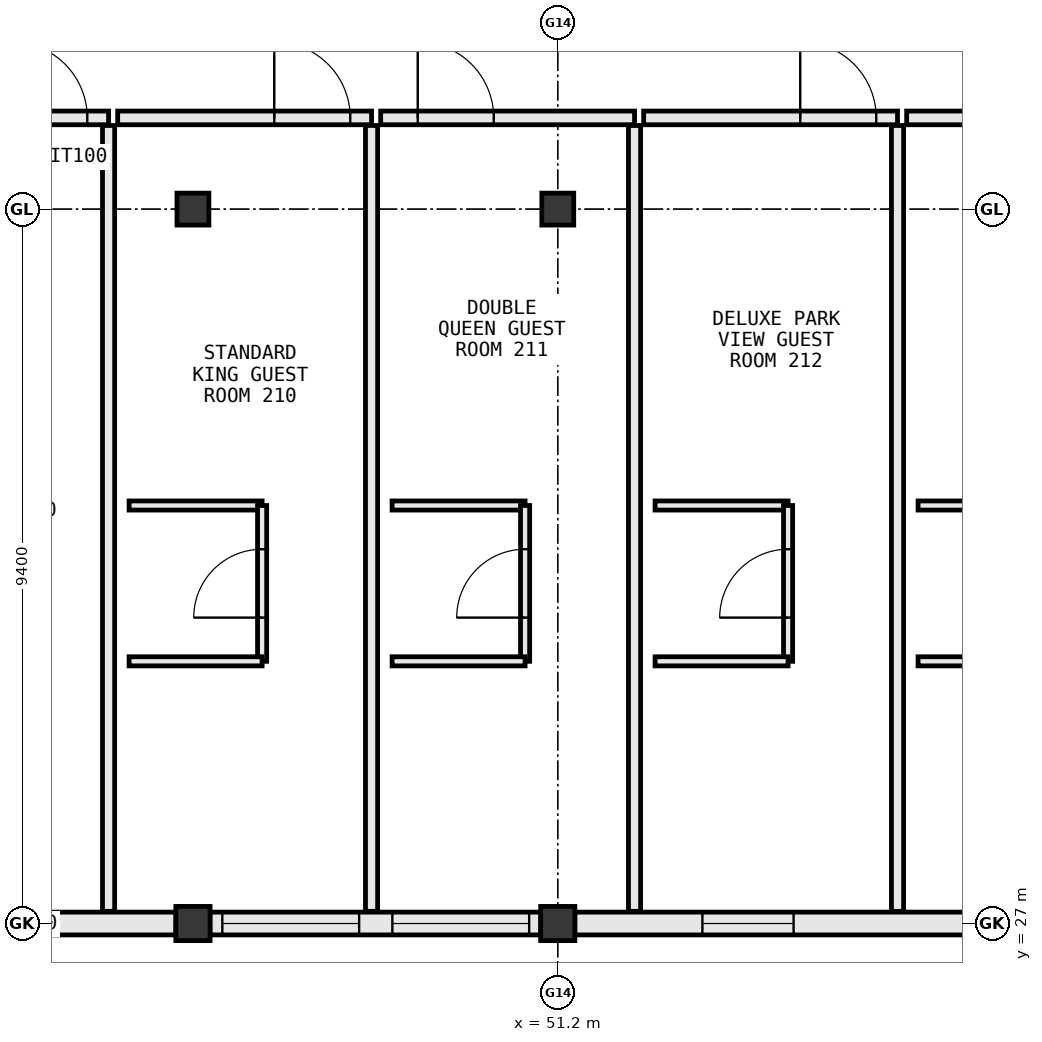
"""IFC4 building model, lengths in metres.
Left out: names, types, materials, properties, quantities, classifications, styles, units other than length and angle.
Written with IfcOpenShell. Run it as: python <this file> out.ifc"""

import sys

from ifc_helpers import new_model, si_unit, direction, frame, frame_2d, origin, origin_2d, place, context, subcontext, project, spatial, rectangle, extrude, element, fill, save


model = new_model("IFC4")
c1 = context("Model", 3, precision=1e-05, world=origin(), true_north=direction((0.0, 1.0)))
c2 = subcontext(c1, "Body", "Model", "MODEL_VIEW")
j1 = project(units=[si_unit("LENGTHUNIT", "METRE"), si_unit("PLANEANGLEUNIT", "RADIAN")], contexts=[c1])
p1 = place(None, origin())
s1 = spatial("IfcSite", under=j1, at=p1, CompositionType="ELEMENT")
p2 = place(p1, origin())
s2 = spatial("IfcBuilding", under=s1, at=p2, CompositionType="ELEMENT")
p3 = place(p2, frame((0.0, 0.0, 27.6)))
s3 = spatial("IfcBuildingStorey", under=s2, at=p3, CompositionType="ELEMENT", Elevation=27.6)
p4 = place(p3, frame((46.4, 27.0, 0.0), z_axis=(0.0, 0.0, 1.0), x_axis=(1.0, 0.0, 0.0)))
e1 = element("IfcColumn", 1, at=p4, inside=s3, PredefinedType="COLUMN", context=c2, shape_type="SweptSolid", body=[
    extrude(rectangle(XDim=0.45, YDim=0.45, at=origin_2d()), origin(), (0.0, 0.0, 1.0), 3.8),
])
p5 = place(p3, frame((46.4, 36.4, 0.0), z_axis=(0.0, 0.0, 1.0), x_axis=(1.0, 0.0, 0.0)))
e2 = element("IfcColumn", 2, at=p5, inside=s3, PredefinedType="COLUMN", context=c2, shape_type="SweptSolid", body=[
    extrude(rectangle(XDim=0.42, YDim=0.42, at=origin_2d()), origin(), (0.0, 0.0, 1.0), 3.8),
])
p6 = place(p3, frame((51.2, 27.0, 0.0), z_axis=(0.0, 0.0, 1.0), x_axis=(1.0, 0.0, 0.0)))
e3 = element("IfcColumn", 3, at=p6, inside=s3, PredefinedType="COLUMN", context=c2, shape_type="SweptSolid", body=[
    extrude(rectangle(XDim=0.45, YDim=0.45, at=origin_2d()), origin(), (0.0, 0.0, 1.0), 3.8),
])
p7 = place(p3, frame((51.2, 36.4, 0.0), z_axis=(0.0, 0.0, 1.0), x_axis=(1.0, 0.0, 0.0)))
e4 = element("IfcColumn", 4, at=p7, inside=s3, PredefinedType="COLUMN", context=c2, shape_type="SweptSolid", body=[
    extrude(rectangle(XDim=0.42, YDim=0.42, at=origin_2d()), origin(), (0.0, 0.0, 1.0), 3.8),
])
p8 = place(p3, frame((41.823, 27.0, 0.0), z_axis=(0.0, 0.0, 1.0), x_axis=(1.0, 0.0, 0.0)))
e5 = element("IfcWall", 5, at=p8, inside=s3, PredefinedType="STANDARD", context=c2, shape_type="SweptSolid", body=[
    extrude(rectangle(XDim=4.354, YDim=0.3, at=frame_2d((2.177, 0.0))), origin(), (0.0, 0.0, 1.0), 3.01),
])
p9 = place(p8, frame((1.577, 0.0, 0.85)))
e6 = element("IfcOpeningElement", 6, at=p9, cuts=e5, PredefinedType="OPENING", context=c2, shape_type="SweptSolid", body=[
    extrude(rectangle(XDim=1.2, YDim=1.55, at=frame_2d((0.6, 0.775))), frame((0.0, 0.162, 0.0), z_axis=(0.0, -1.0, 0.0), x_axis=(1.0, 0.0, 0.0)), (0.0, 0.0, 1.0), 0.324),
])
p10 = place(p3, frame((46.623, 27.0, 0.0), z_axis=(0.0, 0.0, 1.0), x_axis=(1.0, 0.0, 0.0)))
e7 = element("IfcWall", 7, at=p10, inside=s3, PredefinedType="STANDARD", context=c2, shape_type="SweptSolid", body=[
    extrude(rectangle(XDim=4.354, YDim=0.3, at=frame_2d((2.177, 0.0))), origin(), (0.0, 0.0, 1.0), 3.01),
])
p11 = place(p10, frame((0.164, 0.0, 0.85)))
e8 = element("IfcOpeningElement", 8, at=p11, cuts=e7, PredefinedType="OPENING", context=c2, shape_type="SweptSolid", body=[
    extrude(rectangle(XDim=1.8, YDim=1.85, at=frame_2d((0.9, 0.925))), frame((0.0, 0.162, 0.0), z_axis=(0.0, -1.0, 0.0), x_axis=(1.0, 0.0, 0.0)), (0.0, 0.0, 1.0), 0.324),
])
p12 = place(p10, frame((2.4, 0.0, 0.85)))
e9 = element("IfcOpeningElement", 9, at=p12, cuts=e7, PredefinedType="OPENING", context=c2, shape_type="SweptSolid", body=[
    extrude(rectangle(XDim=1.8, YDim=1.85, at=frame_2d((0.9, 0.925))), frame((0.0, 0.162, 0.0), z_axis=(0.0, -1.0, 0.0), x_axis=(1.0, 0.0, 0.0)), (0.0, 0.0, 1.0), 0.324),
])
p13 = place(p3, frame((51.423, 27.0, 0.0), z_axis=(0.0, 0.0, 1.0), x_axis=(1.0, 0.0, 0.0)))
e10 = element("IfcWall", 10, at=p13, inside=s3, PredefinedType="STANDARD", context=c2, shape_type="SweptSolid", body=[
    extrude(rectangle(XDim=9.119, YDim=0.3, at=frame_2d((4.56, 0.0))), origin(), (0.0, 0.0, 1.0), 2.83),
])
p14 = place(p13, frame((1.68, 0.0, 0.85)))
e11 = element("IfcOpeningElement", 11, at=p14, cuts=e10, PredefinedType="OPENING", context=c2, shape_type="SweptSolid", body=[
    extrude(rectangle(XDim=1.2, YDim=1.55, at=frame_2d((0.6, 0.775))), frame((0.0, 0.162, 0.0), z_axis=(0.0, -1.0, 0.0), x_axis=(1.0, 0.0, 0.0)), (0.0, 0.0, 1.0), 0.324),
])
p15 = place(p13, frame((6.239, 0.0, 0.85)))
e12 = element("IfcOpeningElement", 12, at=p15, cuts=e10, PredefinedType="OPENING", context=c2, shape_type="SweptSolid", body=[
    extrude(rectangle(XDim=1.2, YDim=1.55, at=frame_2d((0.6, 0.775))), frame((0.0, 0.162, 0.0), z_axis=(0.0, -1.0, 0.0), x_axis=(1.0, 0.0, 0.0)), (0.0, 0.0, 1.0), 0.324),
])
p16 = place(p3, frame((45.29, 37.6, 0.0), z_axis=(0.0, 0.0, 1.0), x_axis=(-1.0, 0.0, 0.0)))
e13 = element("IfcWall", 13, at=p16, inside=s3, PredefinedType="PARTITIONING", context=c2, shape_type="SweptSolid", body=[
    extrude(rectangle(XDim=3.34, YDim=0.18, at=frame_2d((1.67, 0.0))), origin(), (0.0, 0.0, 1.0), 3.555),
])
p17 = place(p16, frame((0.28, 0.0, 0.0)))
e14 = element("IfcOpeningElement", 14, at=p17, cuts=e13, PredefinedType="OPENING", context=c2, shape_type="SweptSolid", body=[
    extrude(rectangle(XDim=1.0, YDim=2.2, at=frame_2d((0.5, 1.1))), frame((0.0, 0.102, 0.0), z_axis=(0.0, -1.0, 0.0), x_axis=(1.0, 0.0, 0.0)), (0.0, 0.0, 1.0), 0.204),
])
p18 = place(p3, frame((45.29, 27.16, 0.0), z_axis=(0.0, 0.0, 1.0), x_axis=(0.0, 1.0, 0.0)))
e15 = element("IfcWall", 15, at=p18, inside=s3, PredefinedType="PARTITIONING", context=c2, shape_type="SweptSolid", body=[
    extrude(rectangle(XDim=10.34, YDim=0.16, at=frame_2d((5.17, 0.0))), origin(), (0.0, 0.0, 1.0), 3.555),
])
p19 = place(p3, frame((48.75, 37.6, 0.0), z_axis=(0.0, 0.0, 1.0), x_axis=(-1.0, 0.0, 0.0)))
e16 = element("IfcWall", 16, at=p19, inside=s3, PredefinedType="PARTITIONING", context=c2, shape_type="SweptSolid", body=[
    extrude(rectangle(XDim=3.34, YDim=0.18, at=frame_2d((1.67, 0.0))), origin(), (0.0, 0.0, 1.0), 3.555),
])
p20 = place(p19, frame((0.28, 0.0, 0.0)))
e17 = element("IfcOpeningElement", 17, at=p20, cuts=e16, PredefinedType="OPENING", context=c2, shape_type="SweptSolid", body=[
    extrude(rectangle(XDim=1.0, YDim=2.2, at=frame_2d((0.5, 1.1))), frame((0.0, 0.102, 0.0), z_axis=(0.0, -1.0, 0.0), x_axis=(1.0, 0.0, 0.0)), (0.0, 0.0, 1.0), 0.204),
])
p21 = place(p3, frame((48.75, 27.16, 0.0), z_axis=(0.0, 0.0, 1.0), x_axis=(0.0, 1.0, 0.0)))
e18 = element("IfcWall", 18, at=p21, inside=s3, PredefinedType="PARTITIONING", context=c2, shape_type="SweptSolid", body=[
    extrude(rectangle(XDim=10.34, YDim=0.16, at=frame_2d((5.17, 0.0))), origin(), (0.0, 0.0, 1.0), 3.1),
])
p22 = place(p3, frame((45.56, 32.5, 0.0), z_axis=(0.0, 0.0, 1.0), x_axis=(1.0, 0.0, 0.0)))
e19 = element("IfcWall", 19, at=p22, inside=s3, PredefinedType="PARTITIONING", context=c2, shape_type="SweptSolid", body=[
    extrude(rectangle(XDim=1.75, YDim=0.12, at=frame_2d((0.875, 0.0))), origin(), (0.0, 0.0, 1.0), 3.555),
])
p23 = place(p3, frame((47.31, 30.45, 0.0), z_axis=(0.0, 0.0, 1.0), x_axis=(0.0, 1.0, 0.0)))
e20 = element("IfcWall", 20, at=p23, inside=s3, PredefinedType="PARTITIONING", context=c2, shape_type="SweptSolid", body=[
    extrude(rectangle(XDim=2.05, YDim=0.12, at=frame_2d((1.025, 0.0))), origin(), (0.0, 0.0, 1.0), 3.555),
])
p24 = place(p23, frame((0.575, 0.0, 0.0)))
e21 = element("IfcOpeningElement", 21, at=p24, cuts=e20, PredefinedType="OPENING", context=c2, shape_type="SweptSolid", body=[
    extrude(rectangle(XDim=0.9, YDim=2.15, at=frame_2d((0.45, 1.075))), frame((0.0, 0.072, 0.0), z_axis=(0.0, -1.0, 0.0), x_axis=(1.0, 0.0, 0.0)), (0.0, 0.0, 1.0), 0.144),
])
p25 = place(p3, frame((45.56, 30.45, 0.0), z_axis=(0.0, 0.0, 1.0), x_axis=(1.0, 0.0, 0.0)))
e22 = element("IfcWall", 22, at=p25, inside=s3, PredefinedType="PARTITIONING", context=c2, shape_type="SweptSolid", body=[
    extrude(rectangle(XDim=1.75, YDim=0.12, at=frame_2d((0.875, 0.0))), origin(), (0.0, 0.0, 1.0), 3.555),
])
p26 = place(p3, frame((52.21, 37.6, 0.0), z_axis=(0.0, 0.0, 1.0), x_axis=(-1.0, 0.0, 0.0)))
e23 = element("IfcWall", 23, at=p26, inside=s3, PredefinedType="PARTITIONING", context=c2, shape_type="SweptSolid", body=[
    extrude(rectangle(XDim=3.34, YDim=0.18, at=frame_2d((1.67, 0.0))), origin(), (0.0, 0.0, 1.0), 3.555),
])
p27 = place(p26, frame((1.853, 0.0, 0.0)))
e24 = element("IfcOpeningElement", 24, at=p27, cuts=e23, PredefinedType="OPENING", context=c2, shape_type="SweptSolid", body=[
    extrude(rectangle(XDim=1.0, YDim=2.2, at=frame_2d((0.5, 1.1))), frame((0.0, 0.102, 0.0), z_axis=(0.0, -1.0, 0.0), x_axis=(1.0, 0.0, 0.0)), (0.0, 0.0, 1.0), 0.204),
])
p28 = place(p3, frame((52.21, 27.16, 0.0), z_axis=(0.0, 0.0, 1.0), x_axis=(0.0, 1.0, 0.0)))
e25 = element("IfcWall", 25, at=p28, inside=s3, PredefinedType="PARTITIONING", context=c2, shape_type="SweptSolid", body=[
    extrude(rectangle(XDim=10.34, YDim=0.16, at=frame_2d((5.17, 0.0))), origin(), (0.0, 0.0, 1.0), 3.555),
])
p29 = place(p3, frame((49.02, 32.5, 0.0), z_axis=(0.0, 0.0, 1.0), x_axis=(1.0, 0.0, 0.0)))
e26 = element("IfcWall", 26, at=p29, inside=s3, PredefinedType="PARTITIONING", context=c2, shape_type="SweptSolid", body=[
    extrude(rectangle(XDim=1.75, YDim=0.12, at=frame_2d((0.875, 0.0))), origin(), (0.0, 0.0, 1.0), 3.555),
])
p30 = place(p3, frame((50.77, 30.45, 0.0), z_axis=(0.0, 0.0, 1.0), x_axis=(0.0, 1.0, 0.0)))
e27 = element("IfcWall", 27, at=p30, inside=s3, PredefinedType="PARTITIONING", context=c2, shape_type="SweptSolid", body=[
    extrude(rectangle(XDim=2.05, YDim=0.12, at=frame_2d((1.025, 0.0))), origin(), (0.0, 0.0, 1.0), 3.555),
])
p31 = place(p30, frame((0.575, 0.0, 0.0)))
e28 = element("IfcOpeningElement", 28, at=p31, cuts=e27, PredefinedType="OPENING", context=c2, shape_type="SweptSolid", body=[
    extrude(rectangle(XDim=0.9, YDim=2.15, at=frame_2d((0.45, 1.075))), frame((0.0, 0.072, 0.0), z_axis=(0.0, -1.0, 0.0), x_axis=(1.0, 0.0, 0.0)), (0.0, 0.0, 1.0), 0.144),
])
p32 = place(p3, frame((49.02, 30.45, 0.0), z_axis=(0.0, 0.0, 1.0), x_axis=(1.0, 0.0, 0.0)))
e29 = element("IfcWall", 29, at=p32, inside=s3, PredefinedType="PARTITIONING", context=c2, shape_type="SweptSolid", body=[
    extrude(rectangle(XDim=1.75, YDim=0.12, at=frame_2d((0.875, 0.0))), origin(), (0.0, 0.0, 1.0), 3.555),
])
p33 = place(p3, frame((55.67, 37.6, 0.0), z_axis=(0.0, 0.0, 1.0), x_axis=(-1.0, 0.0, 0.0)))
e30 = element("IfcWall", 30, at=p33, inside=s3, PredefinedType="PARTITIONING", context=c2, shape_type="SweptSolid", body=[
    extrude(rectangle(XDim=3.34, YDim=0.18, at=frame_2d((1.67, 0.0))), origin(), (0.0, 0.0, 1.0), 3.555),
])
p34 = place(p33, frame((0.28, 0.0, 0.0)))
e31 = element("IfcOpeningElement", 31, at=p34, cuts=e30, PredefinedType="OPENING", context=c2, shape_type="SweptSolid", body=[
    extrude(rectangle(XDim=1.0, YDim=2.2, at=frame_2d((0.5, 1.1))), frame((0.0, 0.102, 0.0), z_axis=(0.0, -1.0, 0.0), x_axis=(1.0, 0.0, 0.0)), (0.0, 0.0, 1.0), 0.204),
])
p35 = place(p3, frame((55.67, 27.16, 0.0), z_axis=(0.0, 0.0, 1.0), x_axis=(0.0, 1.0, 0.0)))
e32 = element("IfcWall", 32, at=p35, inside=s3, PredefinedType="PARTITIONING", context=c2, shape_type="SweptSolid", body=[
    extrude(rectangle(XDim=10.34, YDim=0.16, at=frame_2d((5.17, 0.0))), origin(), (0.0, 0.0, 1.0), 3.555),
])
p36 = place(p3, frame((52.48, 32.5, 0.0), z_axis=(0.0, 0.0, 1.0), x_axis=(1.0, 0.0, 0.0)))
e33 = element("IfcWall", 33, at=p36, inside=s3, PredefinedType="PARTITIONING", context=c2, shape_type="SweptSolid", body=[
    extrude(rectangle(XDim=1.75, YDim=0.12, at=frame_2d((0.875, 0.0))), origin(), (0.0, 0.0, 1.0), 3.555),
])
p37 = place(p3, frame((54.23, 30.45, 0.0), z_axis=(0.0, 0.0, 1.0), x_axis=(0.0, 1.0, 0.0)))
e34 = element("IfcWall", 34, at=p37, inside=s3, PredefinedType="PARTITIONING", context=c2, shape_type="SweptSolid", body=[
    extrude(rectangle(XDim=2.05, YDim=0.12, at=frame_2d((1.025, 0.0))), origin(), (0.0, 0.0, 1.0), 3.1),
])
p38 = place(p37, frame((0.575, 0.0, 0.0)))
e35 = element("IfcOpeningElement", 35, at=p38, cuts=e34, PredefinedType="OPENING", context=c2, shape_type="SweptSolid", body=[
    extrude(rectangle(XDim=0.9, YDim=2.15, at=frame_2d((0.45, 1.075))), frame((0.0, 0.072, 0.0), z_axis=(0.0, -1.0, 0.0), x_axis=(1.0, 0.0, 0.0)), (0.0, 0.0, 1.0), 0.144),
])
p39 = place(p3, frame((52.48, 30.45, 0.0), z_axis=(0.0, 0.0, 1.0), x_axis=(1.0, 0.0, 0.0)))
e36 = element("IfcWall", 36, at=p39, inside=s3, PredefinedType="PARTITIONING", context=c2, shape_type="SweptSolid", body=[
    extrude(rectangle(XDim=1.75, YDim=0.12, at=frame_2d((0.875, 0.0))), origin(), (0.0, 0.0, 1.0), 3.555),
])
p40 = place(p3, frame((60.33, 37.6, 0.0), z_axis=(0.0, 0.0, 1.0), x_axis=(-1.0, 0.0, 0.0)))
e37 = element("IfcWall", 37, at=p40, inside=s3, PredefinedType="PARTITIONING", context=c2, shape_type="SweptSolid", body=[
    extrude(rectangle(XDim=4.54, YDim=0.18, at=frame_2d((2.27, 0.0))), origin(), (0.0, 0.0, 1.0), 3.555),
])
p41 = place(p40, frame((0.79, 0.0, 0.0)))
e38 = element("IfcOpeningElement", 38, at=p41, cuts=e37, PredefinedType="OPENING", context=c2, shape_type="SweptSolid", body=[
    extrude(rectangle(XDim=1.0, YDim=2.2, at=frame_2d((0.5, 1.1))), frame((0.0, 0.102, 0.0), z_axis=(0.0, -1.0, 0.0), x_axis=(1.0, 0.0, 0.0)), (0.0, 0.0, 1.0), 0.204),
])
for number, where, z_axis, x_axis in (
    (39, (55.94, 32.5, 0.0), (0.0, 0.0, 1.0), (1.0, 0.0, 0.0)),
    (40, (55.94, 30.45, 0.0), (0.0, 0.0, 1.0), (1.0, 0.0, 0.0)),
):
    element("IfcWall", number, at=place(p3, frame(where, z_axis=z_axis, x_axis=x_axis)), inside=s3, PredefinedType="PARTITIONING", context=c2, shape_type="SweptSolid", body=[
        extrude(rectangle(XDim=1.75, YDim=0.12, at=frame_2d((0.875, 0.0))), origin(), (0.0, 0.0, 1.0), 3.555),
    ])
p42 = place(p9, origin())
e41 = element("IfcWindow", 41, at=p42, inside=s3, PartitioningType="SINGLE_PANEL", PredefinedType="WINDOW", context=c2, shape_type="SweptSolid", body=[
    extrude(rectangle(XDim=1.2, YDim=1.55, at=frame_2d((0.6, 0.775))), frame((0.0, 0.03, 0.0), z_axis=(0.0, -1.0, 0.0), x_axis=(1.0, 0.0, 0.0)), (0.0, 0.0, 1.0), 0.06),
])
fill(e6, e41)
p43 = place(p14, origin())
e42 = element("IfcWindow", 42, at=p43, inside=s3, PartitioningType="SINGLE_PANEL", PredefinedType="WINDOW", context=c2, shape_type="SweptSolid", body=[
    extrude(rectangle(XDim=1.2, YDim=1.55, at=frame_2d((0.6, 0.775))), frame((0.0, 0.03, 0.0), z_axis=(0.0, -1.0, 0.0), x_axis=(1.0, 0.0, 0.0)), (0.0, 0.0, 1.0), 0.06),
])
fill(e11, e42)
p44 = place(p11, origin())
e43 = element("IfcWindow", 43, at=p44, inside=s3, PartitioningType="SINGLE_PANEL", PredefinedType="WINDOW", context=c2, shape_type="SweptSolid", body=[
    extrude(rectangle(XDim=1.8, YDim=1.85, at=frame_2d((0.9, 0.925))), frame((0.0, 0.03, 0.0), z_axis=(0.0, -1.0, 0.0), x_axis=(1.0, 0.0, 0.0)), (0.0, 0.0, 1.0), 0.06),
])
fill(e8, e43)
p45 = place(p12, origin())
e44 = element("IfcWindow", 44, at=p45, inside=s3, PartitioningType="SINGLE_PANEL", PredefinedType="WINDOW", context=c2, shape_type="SweptSolid", body=[
    extrude(rectangle(XDim=1.8, YDim=1.85, at=frame_2d((0.9, 0.925))), frame((0.0, 0.03, 0.0), z_axis=(0.0, -1.0, 0.0), x_axis=(1.0, 0.0, 0.0)), (0.0, 0.0, 1.0), 0.06),
])
fill(e9, e44)
p46 = place(p17, frame((1.0, 0.0, 0.0), z_axis=(0.0, 0.0, 1.0), x_axis=(-1.0, 0.0, 0.0)))
e45 = element("IfcDoor", 45, at=p46, inside=s3, OperationType="SINGLE_SWING_RIGHT", PredefinedType="DOOR", context=c2, shape_type="SweptSolid", body=[
    extrude(rectangle(XDim=1.0, YDim=2.2, at=frame_2d((0.5, 1.1))), frame((0.0, 0.025, 0.0), z_axis=(0.0, -1.0, 0.0), x_axis=(1.0, 0.0, 0.0)), (0.0, 0.0, 1.0), 0.05),
])
fill(e14, e45)
p47 = place(p20, frame((1.0, 0.0, 0.0), z_axis=(0.0, 0.0, 1.0), x_axis=(-1.0, 0.0, 0.0)))
e46 = element("IfcDoor", 46, at=p47, inside=s3, OperationType="SINGLE_SWING_RIGHT", PredefinedType="DOOR", context=c2, shape_type="SweptSolid", body=[
    extrude(rectangle(XDim=1.0, YDim=2.2, at=frame_2d((0.5, 1.1))), frame((0.0, 0.025, 0.0), z_axis=(0.0, -1.0, 0.0), x_axis=(1.0, 0.0, 0.0)), (0.0, 0.0, 1.0), 0.05),
])
fill(e17, e46)
p48 = place(p24, origin())
e47 = element("IfcDoor", 47, at=p48, inside=s3, OperationType="SINGLE_SWING_LEFT", PredefinedType="DOOR", context=c2, shape_type="SweptSolid", body=[
    extrude(rectangle(XDim=0.9, YDim=2.15, at=frame_2d((0.45, 1.075))), frame((0.0, 0.025, 0.0), z_axis=(0.0, -1.0, 0.0), x_axis=(1.0, 0.0, 0.0)), (0.0, 0.0, 1.0), 0.05),
])
fill(e21, e47)
p49 = place(p27, frame((1.0, 0.0, 0.0), z_axis=(0.0, 0.0, 1.0), x_axis=(-1.0, 0.0, 0.0)))
e48 = element("IfcDoor", 48, at=p49, inside=s3, OperationType="SINGLE_SWING_RIGHT", PredefinedType="DOOR", context=c2, shape_type="SweptSolid", body=[
    extrude(rectangle(XDim=1.0, YDim=2.2, at=frame_2d((0.5, 1.1))), frame((0.0, 0.025, 0.0), z_axis=(0.0, -1.0, 0.0), x_axis=(1.0, 0.0, 0.0)), (0.0, 0.0, 1.0), 0.05),
])
fill(e24, e48)
p50 = place(p31, origin())
e49 = element("IfcDoor", 49, at=p50, inside=s3, OperationType="SINGLE_SWING_LEFT", PredefinedType="DOOR", context=c2, shape_type="SweptSolid", body=[
    extrude(rectangle(XDim=0.9, YDim=2.15, at=frame_2d((0.45, 1.075))), frame((0.0, 0.025, 0.0), z_axis=(0.0, -1.0, 0.0), x_axis=(1.0, 0.0, 0.0)), (0.0, 0.0, 1.0), 0.05),
])
fill(e28, e49)
p51 = place(p34, frame((1.0, 0.0, 0.0), z_axis=(0.0, 0.0, 1.0), x_axis=(-1.0, 0.0, 0.0)))
e50 = element("IfcDoor", 50, at=p51, inside=s3, OperationType="SINGLE_SWING_RIGHT", PredefinedType="DOOR", context=c2, shape_type="SweptSolid", body=[
    extrude(rectangle(XDim=1.0, YDim=2.2, at=frame_2d((0.5, 1.1))), frame((0.0, 0.025, 0.0), z_axis=(0.0, -1.0, 0.0), x_axis=(1.0, 0.0, 0.0)), (0.0, 0.0, 1.0), 0.05),
])
fill(e31, e50)
p52 = place(p38, origin())
e51 = element("IfcDoor", 51, at=p52, inside=s3, OperationType="SINGLE_SWING_LEFT", PredefinedType="DOOR", context=c2, shape_type="SweptSolid", body=[
    extrude(rectangle(XDim=0.9, YDim=2.15, at=frame_2d((0.45, 1.075))), frame((0.0, 0.025, 0.0), z_axis=(0.0, -1.0, 0.0), x_axis=(1.0, 0.0, 0.0)), (0.0, 0.0, 1.0), 0.05),
])
fill(e35, e51)
save(model, sys.argv[1])
